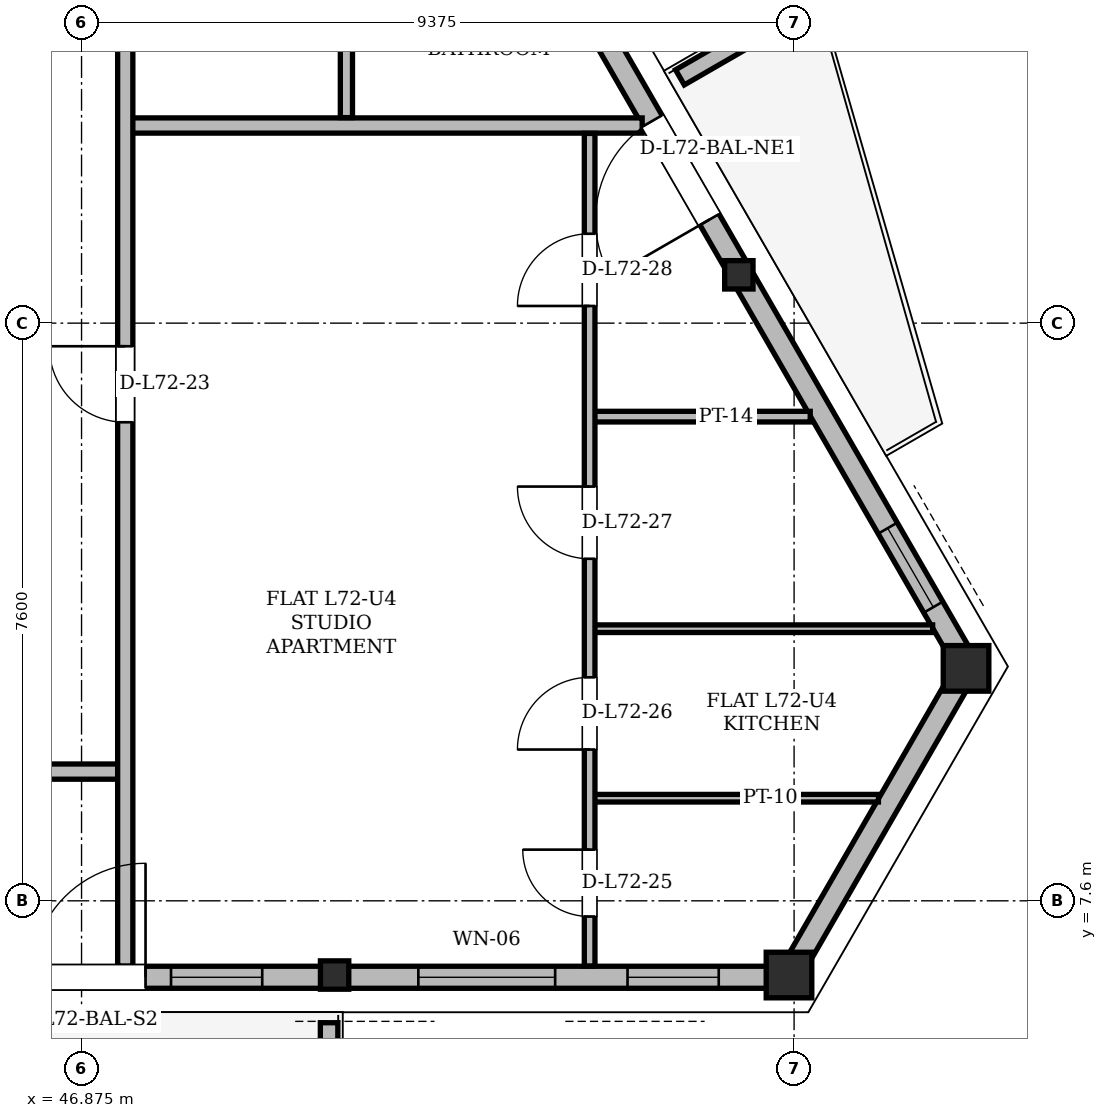
"""IFC4 building model, lengths in metres.
Left out: names, types, materials, properties, quantities, classifications, styles, units other than length and angle.
Written with IfcOpenShell. Run it as: python <this file> out.ifc"""

import sys

from ifc_helpers import new_model, si_unit, direction, frame, frame_2d, origin, origin_2d, place, context, subcontext, project, spatial, polyline, rectangle, hollow_rectangle, i_section, outline, extrude, element, fill, save


model = new_model("IFC4")
c1 = context("Model", 3, precision=1e-05, world=origin(), true_north=direction((0.0, 1.0)))
c2 = subcontext(c1, "Body", "Model", "MODEL_VIEW")
j1 = project(units=[si_unit("LENGTHUNIT", "METRE"), si_unit("PLANEANGLEUNIT", "RADIAN")], contexts=[c1])
p1 = place(None, origin())
s1 = spatial("IfcSite", under=j1, at=p1, CompositionType="ELEMENT")
p2 = place(p1, origin())
s2 = spatial("IfcBuilding", under=s1, at=p2, CompositionType="ELEMENT")
p3 = place(p2, frame((0.0, 0.0, 273.3)))
s3 = spatial("IfcBuildingStorey", under=s2, at=p3, CompositionType="ELEMENT", Elevation=273.3)
for number, where, z_axis, x_axis in (
    (1, (56.171, 6.594, 0.004), (0.006, 0.015, 1.0), (-0.931, 0.365, 0.0)),
    (2, (58.532, 10.683, 0.004), (-0.01, -0.013, 1.0), (0.785, -0.62, 0.0)),
):
    element("IfcColumn", number, at=place(p3, frame(where, z_axis=z_axis, x_axis=x_axis)), inside=s3, PredefinedType="COLUMN", context=c2, shape_type="SweptSolid", body=[
        extrude(hollow_rectangle(XDim=0.6, YDim=0.6, WallThickness=0.045, at=origin_2d()), origin(), (0.0, 0.0, 1.0), 3.892),
    ])
for number, where, z_axis, x_axis in (
    (3, (50.197, 6.594, 0.004), (0.004, 0.015, 1.0), (-0.966, 0.259, 0.0)),
    (4, (55.545, 15.857, 0.004), (-0.011, -0.011, 1.0), (0.707, -0.707, 0.0)),
):
    element("IfcColumn", number, at=place(p3, frame(where, z_axis=z_axis, x_axis=x_axis)), inside=s3, PredefinedType="COLUMN", context=c2, shape_type="SweptSolid", body=[
        extrude(i_section(OverallWidth=0.373, OverallDepth=0.373, WebThickness=0.016, FlangeThickness=0.026, at=origin_2d()), origin(), (0.0, 0.0, 1.0), 3.892),
    ])
p4 = place(p3, frame((18.829, 6.594, 0.0), z_axis=(0.0, 0.0, 1.0), x_axis=(1.0, 0.0, 0.0)))
e5 = element("IfcWall", 5, at=p4, inside=s3, PredefinedType="SOLIDWALL", context=c2, shape_type="SweptSolid", body=[
    extrude(rectangle(XDim=37.343, YDim=0.29, at=frame_2d((18.671, 0.0))), origin(), (0.0, 0.0, 1.0), 3.058),
])
p5 = place(p4, frame((3.639, 0.0, 0.0)))
e6 = element("IfcOpeningElement", 6, at=p5, cuts=e5, PredefinedType="OPENING", context=c2, shape_type="SweptSolid", body=[
    extrude(rectangle(XDim=1.5, YDim=2.2, at=frame_2d((0.75, 1.1))), frame((0.0, 0.145, 0.0), z_axis=(0.0, -1.0, 0.0), x_axis=(1.0, 0.0, 0.0)), (0.0, 0.0, 1.0), 0.29),
])
p6 = place(p4, frame((27.388, 0.0, 0.0)))
e7 = element("IfcOpeningElement", 7, at=p6, cuts=e5, PredefinedType="OPENING", context=c2, shape_type="SweptSolid", body=[
    extrude(rectangle(XDim=1.5, YDim=2.2, at=frame_2d((0.75, 1.1))), frame((0.0, 0.145, 0.0), z_axis=(0.0, -1.0, 0.0), x_axis=(1.0, 0.0, 0.0)), (0.0, 0.0, 1.0), 0.29),
])
p7 = place(p4, frame((11.813, 0.0, 0.85)))
e8 = element("IfcOpeningElement", 8, at=p7, cuts=e5, PredefinedType="OPENING", context=c2, shape_type="SweptSolid", body=[
    extrude(rectangle(XDim=1.2, YDim=1.48, at=frame_2d((0.6, 0.74))), frame((0.0, 0.145, 0.0), z_axis=(0.0, -1.0, 0.0), x_axis=(1.0, 0.0, 0.0)), (0.0, 0.0, 1.0), 0.29),
])
p8 = place(p4, frame((0.897, 0.0, 0.85)))
e9 = element("IfcOpeningElement", 9, at=p8, cuts=e5, PredefinedType="OPENING", context=c2, shape_type="SweptSolid", body=[
    extrude(rectangle(XDim=1.2, YDim=1.48, at=frame_2d((0.6, 0.74))), frame((0.0, 0.145, 0.0), z_axis=(0.0, -1.0, 0.0), x_axis=(1.0, 0.0, 0.0)), (0.0, 0.0, 1.0), 0.29),
])
p9 = place(p4, frame((19.512, 0.0, 0.85)))
e10 = element("IfcOpeningElement", 10, at=p9, cuts=e5, PredefinedType="OPENING", context=c2, shape_type="SweptSolid", body=[
    extrude(rectangle(XDim=1.6, YDim=1.7, at=frame_2d((0.8, 0.85))), frame((0.0, 0.145, 0.0), z_axis=(0.0, -1.0, 0.0), x_axis=(1.0, 0.0, 0.0)), (0.0, 0.0, 1.0), 0.29),
])
p10 = place(p4, frame((29.224, 0.0, 0.85)))
e11 = element("IfcOpeningElement", 11, at=p10, cuts=e5, PredefinedType="OPENING", context=c2, shape_type="SweptSolid", body=[
    extrude(rectangle(XDim=1.2, YDim=1.48, at=frame_2d((0.6, 0.74))), frame((0.0, 0.145, 0.0), z_axis=(0.0, -1.0, 0.0), x_axis=(1.0, 0.0, 0.0)), (0.0, 0.0, 1.0), 0.29),
])
p11 = place(p4, frame((32.478, 0.0, 0.85)))
e12 = element("IfcOpeningElement", 12, at=p11, cuts=e5, PredefinedType="OPENING", context=c2, shape_type="SweptSolid", body=[
    extrude(rectangle(XDim=1.8, YDim=1.75, at=frame_2d((0.9, 0.875))), frame((0.0, 0.145, 0.0), z_axis=(0.0, -1.0, 0.0), x_axis=(1.0, 0.0, 0.0)), (0.0, 0.0, 1.0), 0.29),
])
p12 = place(p4, frame((35.23, 0.0, 0.85)))
e13 = element("IfcOpeningElement", 13, at=p12, cuts=e5, PredefinedType="OPENING", context=c2, shape_type="SweptSolid", body=[
    extrude(rectangle(XDim=1.2, YDim=1.48, at=frame_2d((0.6, 0.74))), frame((0.0, 0.145, 0.0), z_axis=(0.0, -1.0, 0.0), x_axis=(1.0, 0.0, 0.0)), (0.0, 0.0, 1.0), 0.29),
])
p13 = place(p3, frame((56.171, 6.594, 0.0), z_axis=(0.0, 0.0, 1.0), x_axis=(0.499959680857, 0.866048680801, 0.0)))
e14 = element("IfcWall", 14, at=p13, inside=s3, PredefinedType="SOLIDWALL", context=c2, shape_type="SweptSolid", body=[
    extrude(rectangle(XDim=4.722, YDim=0.29, at=frame_2d((2.361, 0.0))), origin(), (0.0, 0.0, 1.0), 3.058),
])
p14 = place(p3, frame((58.532, 10.683, 0.0), z_axis=(0.0, 0.0, 1.0), x_axis=(-0.499999381892, 0.866025760649, 0.0)))
e15 = element("IfcWall", 15, at=p14, inside=s3, PredefinedType="SOLIDWALL", context=c2, shape_type="SweptSolid", body=[
    extrude(rectangle(XDim=37.343, YDim=0.29, at=frame_2d((18.671, 0.0))), origin(), (0.0, 0.0, 1.0), 3.058),
])
p15 = place(p14, frame((6.789, 0.0, 0.0)))
e16 = element("IfcOpeningElement", 16, at=p15, cuts=e15, PredefinedType="OPENING", context=c2, shape_type="SweptSolid", body=[
    extrude(rectangle(XDim=1.5, YDim=2.2, at=frame_2d((0.75, 1.1))), frame((0.0, 0.145, 0.0), z_axis=(0.0, -1.0, 0.0), x_axis=(1.0, 0.0, 0.0)), (0.0, 0.0, 1.0), 0.29),
])
p16 = place(p14, frame((27.808, 0.0, 0.0)))
e17 = element("IfcOpeningElement", 17, at=p16, cuts=e15, PredefinedType="OPENING", context=c2, shape_type="SweptSolid", body=[
    extrude(rectangle(XDim=1.5, YDim=2.2, at=frame_2d((0.75, 1.1))), frame((0.0, 0.145, 0.0), z_axis=(0.0, -1.0, 0.0), x_axis=(1.0, 0.0, 0.0)), (0.0, 0.0, 1.0), 0.29),
])
p17 = place(p14, frame((0.901, 0.0, 0.85)))
e18 = element("IfcOpeningElement", 18, at=p17, cuts=e15, PredefinedType="OPENING", context=c2, shape_type="SweptSolid", body=[
    extrude(rectangle(XDim=1.2, YDim=1.48, at=frame_2d((0.6, 0.74))), frame((0.0, 0.145, 0.0), z_axis=(0.0, -1.0, 0.0), x_axis=(1.0, 0.0, 0.0)), (0.0, 0.0, 1.0), 0.29),
])
p18 = place(p14, frame((12.688, 0.0, 0.85)))
e19 = element("IfcOpeningElement", 19, at=p18, cuts=e15, PredefinedType="OPENING", context=c2, shape_type="SweptSolid", body=[
    extrude(rectangle(XDim=3.0, YDim=2.098, at=frame_2d((1.5, 1.049))), frame((0.0, 0.145, 0.0), z_axis=(0.0, -1.0, 0.0), x_axis=(1.0, 0.0, 0.0)), (0.0, 0.0, 1.0), 0.29),
])
p19 = place(p14, frame((17.814, 0.0, 0.85)))
e20 = element("IfcOpeningElement", 20, at=p19, cuts=e15, PredefinedType="OPENING", context=c2, shape_type="SweptSolid", body=[
    extrude(rectangle(XDim=2.6, YDim=1.95, at=frame_2d((1.3, 0.975))), frame((0.0, 0.145, 0.0), z_axis=(0.0, -1.0, 0.0), x_axis=(1.0, 0.0, 0.0)), (0.0, 0.0, 1.0), 0.29),
])
p20 = place(p14, frame((35.362, 0.0, 0.85)))
e21 = element("IfcOpeningElement", 21, at=p20, cuts=e15, PredefinedType="OPENING", context=c2, shape_type="SweptSolid", body=[
    extrude(rectangle(XDim=1.2, YDim=1.48, at=frame_2d((0.6, 0.74))), frame((0.0, 0.145, 0.0), z_axis=(0.0, -1.0, 0.0), x_axis=(1.0, 0.0, 0.0)), (0.0, 0.0, 1.0), 0.29),
])
p21 = place(p14, frame((33.788, 0.0, 0.85)))
e22 = element("IfcOpeningElement", 22, at=p21, cuts=e15, PredefinedType="OPENING", context=c2, shape_type="SweptSolid", body=[
    extrude(rectangle(XDim=1.2, YDim=1.48, at=frame_2d((0.6, 0.74))), frame((0.0, 0.145, 0.0), z_axis=(0.0, -1.0, 0.0), x_axis=(1.0, 0.0, 0.0)), (0.0, 0.0, 1.0), 0.29),
])
p22 = place(p14, frame((22.74, 0.0, 0.85)))
e23 = element("IfcOpeningElement", 23, at=p22, cuts=e15, PredefinedType="OPENING", context=c2, shape_type="SweptSolid", body=[
    extrude(rectangle(XDim=1.2, YDim=1.48, at=frame_2d((0.6, 0.74))), frame((0.0, 0.145, 0.0), z_axis=(0.0, -1.0, 0.0), x_axis=(1.0, 0.0, 0.0)), (0.0, 0.0, 1.0), 0.29),
])
p23 = place(p14, frame((31.705, 0.0, 0.85)))
e24 = element("IfcOpeningElement", 24, at=p23, cuts=e15, PredefinedType="OPENING", context=c2, shape_type="SweptSolid", body=[
    extrude(rectangle(XDim=1.2, YDim=1.48, at=frame_2d((0.6, 0.74))), frame((0.0, 0.145, 0.0), z_axis=(0.0, -1.0, 0.0), x_axis=(1.0, 0.0, 0.0)), (0.0, 0.0, 1.0), 0.29),
])
for number, where, z_axis, x_axis in (
    (25, (50.132, 5.996, 0.0), (0.0, 0.0, 1.0), (0.0, -1.0, 0.0)),
    (26, (54.748, 18.434, 0.0), (0.0, 0.0, 1.0), (0.866, 0.5, 0.0)),
):
    element("IfcWall", number, at=place(p3, frame(where, z_axis=z_axis, x_axis=x_axis)), inside=s3, PredefinedType="PARAPET", context=c2, shape_type="SweptSolid", body=[
        extrude(outline(polyline([(0.0, 0.0), (2.042, 0.0), (2.042, 1.1), (0.0, 1.32), (0.0, 0.0)])), frame((0.0, 0.115, 0.0), z_axis=(0.0, -1.0, 0.0), x_axis=(1.0, 0.0, 0.0)), (0.0, 0.0, 1.0), 0.23),
    ])
p24 = place(p3, frame((53.559, 8.95, 0.0), z_axis=(0.0, 0.0, 1.0), x_axis=(1.0, 0.0, 0.0)))
e27 = element("IfcWall", 27, at=p24, inside=s3, PredefinedType="PARTITIONING", context=c2, shape_type="SweptSolid", body=[
    extrude(rectangle(XDim=3.801, YDim=0.1, at=frame_2d((1.9, 0.0))), origin(), (0.0, 0.0, 1.0), 3.68),
])
p25 = place(p3, frame((25.6, 9.3, 0.0), z_axis=(0.0, 0.0, 1.0), x_axis=(1.0, 0.0, 0.0)))
e28 = element("IfcWall", 28, at=p25, inside=s3, PredefinedType="PARTITIONING", context=c2, shape_type="SweptSolid", body=[
    extrude(rectangle(XDim=21.85, YDim=0.2, at=frame_2d((10.925, 0.0))), origin(), (0.0, 0.0, 1.0), 3.68),
])
p26 = place(p25, frame((3.841, 0.0, 0.0)))
e29 = element("IfcOpeningElement", 29, at=p26, cuts=e28, PredefinedType="OPENING", context=c2, shape_type="SweptSolid", body=[
    extrude(rectangle(XDim=1.0, YDim=2.18, at=frame_2d((0.5, 1.09))), frame((0.0, 0.1, 0.0), z_axis=(0.0, -1.0, 0.0), x_axis=(1.0, 0.0, 0.0)), (0.0, 0.0, 1.0), 0.2),
])
p27 = place(p25, frame((16.232, 0.0, 0.0)))
e30 = element("IfcOpeningElement", 30, at=p27, cuts=e28, PredefinedType="OPENING", context=c2, shape_type="SweptSolid", body=[
    extrude(rectangle(XDim=1.0, YDim=2.18, at=frame_2d((0.5, 1.09))), frame((0.0, 0.1, 0.0), z_axis=(0.0, -1.0, 0.0), x_axis=(1.0, 0.0, 0.0)), (0.0, 0.0, 1.0), 0.2),
])
p28 = place(p3, frame((53.559, 11.18, 0.0), z_axis=(0.0, 0.0, 1.0), x_axis=(1.0, 0.0, 0.0)))
e31 = element("IfcWall", 31, at=p28, inside=s3, PredefinedType="PARTITIONING", context=c2, shape_type="SweptSolid", body=[
    extrude(rectangle(XDim=4.514, YDim=0.1, at=frame_2d((2.257, 0.0))), origin(), (0.0, 0.0, 1.0), 3.68),
])
p29 = place(p3, frame((53.559, 13.97, 0.0), z_axis=(0.0, 0.0, 1.0), x_axis=(1.0, 0.0, 0.0)))
e32 = element("IfcWall", 32, at=p29, inside=s3, PredefinedType="PARTITIONING", context=c2, shape_type="SweptSolid", body=[
    extrude(rectangle(XDim=2.903, YDim=0.14, at=frame_2d((1.452, 0.0))), origin(), (0.0, 0.0, 1.0), 3.68),
])
p30 = place(p3, frame((47.45, 17.8, 0.0), z_axis=(0.0, 0.0, 1.0), x_axis=(1.0, 0.0, 0.0)))
e33 = element("IfcWall", 33, at=p30, inside=s3, PredefinedType="PARTITIONING", context=c2, shape_type="SweptSolid", body=[
    extrude(rectangle(XDim=6.801, YDim=0.2, at=frame_2d((3.401, 0.0))), origin(), (0.0, 0.0, 1.0), 3.68),
])
p31 = place(p3, frame((47.45, 6.743, 0.0), z_axis=(0.0, 0.0, 1.0), x_axis=(0.0, 1.0, 0.0)))
e34 = element("IfcWall", 34, at=p31, inside=s3, PredefinedType="PARTITIONING", context=c2, shape_type="SweptSolid", body=[
    extrude(rectangle(XDim=22.837, YDim=0.2, at=frame_2d((11.418, 0.0))), origin(), (0.0, 0.0, 1.0), 3.058),
])
p32 = place(p31, frame((7.153, 0.0, 0.0)))
e35 = element("IfcOpeningElement", 35, at=p32, cuts=e34, PredefinedType="OPENING", context=c2, shape_type="SweptSolid", body=[
    extrude(rectangle(XDim=1.0, YDim=2.18, at=frame_2d((0.5, 1.09))), frame((0.0, 0.1, 0.0), z_axis=(0.0, -1.0, 0.0), x_axis=(1.0, 0.0, 0.0)), (0.0, 0.0, 1.0), 0.2),
])
p33 = place(p31, frame((15.139, 0.0, 0.0)))
e36 = element("IfcOpeningElement", 36, at=p33, cuts=e34, PredefinedType="OPENING", context=c2, shape_type="SweptSolid", body=[
    extrude(rectangle(XDim=1.0, YDim=2.18, at=frame_2d((0.5, 1.09))), frame((0.0, 0.1, 0.0), z_axis=(0.0, -1.0, 0.0), x_axis=(1.0, 0.0, 0.0)), (0.0, 0.0, 1.0), 0.2),
])
p34 = place(p3, frame((50.36, 17.904, 0.0), z_axis=(0.0, 0.0, 1.0), x_axis=(0.0, 1.0, 0.0)))
e37 = element("IfcWall", 37, at=p34, inside=s3, PredefinedType="PARTITIONING", context=c2, shape_type="SweptSolid", body=[
    extrude(rectangle(XDim=2.672, YDim=0.16, at=frame_2d((1.336, 0.0))), origin(), (0.0, 0.0, 1.0), 3.68),
])
p35 = place(p3, frame((53.56, 6.743, 0.0), z_axis=(0.0, 0.0, 1.0), x_axis=(0.0, 1.0, 0.0)))
e38 = element("IfcWall", 38, at=p35, inside=s3, PredefinedType="PARTITIONING", context=c2, shape_type="SweptSolid", body=[
    extrude(rectangle(XDim=10.953, YDim=0.14, at=frame_2d((5.477, 0.0))), origin(), (0.0, 0.0, 1.0), 3.266),
])
p36 = place(p35, frame((0.65, 0.0, 0.0)))
e39 = element("IfcOpeningElement", 39, at=p36, cuts=e38, PredefinedType="OPENING", context=c2, shape_type="SweptSolid", body=[
    extrude(rectangle(XDim=0.88, YDim=2.08, at=frame_2d((0.44, 1.04))), frame((0.0, 0.07, 0.0), z_axis=(0.0, -1.0, 0.0), x_axis=(1.0, 0.0, 0.0)), (0.0, 0.0, 1.0), 0.14),
])
p37 = place(p35, frame((2.847, 0.0, 0.0)))
e40 = element("IfcOpeningElement", 40, at=p37, cuts=e38, PredefinedType="OPENING", context=c2, shape_type="SweptSolid", body=[
    extrude(rectangle(XDim=0.95, YDim=2.1, at=frame_2d((0.475, 1.05))), frame((0.0, 0.07, 0.0), z_axis=(0.0, -1.0, 0.0), x_axis=(1.0, 0.0, 0.0)), (0.0, 0.0, 1.0), 0.14),
])
p38 = place(p35, frame((5.357, 0.0, 0.0)))
e41 = element("IfcOpeningElement", 41, at=p38, cuts=e38, PredefinedType="OPENING", context=c2, shape_type="SweptSolid", body=[
    extrude(rectangle(XDim=0.95, YDim=2.1, at=frame_2d((0.475, 1.05))), frame((0.0, 0.07, 0.0), z_axis=(0.0, -1.0, 0.0), x_axis=(1.0, 0.0, 0.0)), (0.0, 0.0, 1.0), 0.14),
])
p39 = place(p35, frame((8.683, 0.0, 0.0)))
e42 = element("IfcOpeningElement", 42, at=p39, cuts=e38, PredefinedType="OPENING", context=c2, shape_type="SweptSolid", body=[
    extrude(rectangle(XDim=0.95, YDim=2.1, at=frame_2d((0.475, 1.05))), frame((0.0, 0.07, 0.0), z_axis=(0.0, -1.0, 0.0), x_axis=(1.0, 0.0, 0.0)), (0.0, 0.0, 1.0), 0.14),
])
p40 = place(p6, origin())
e43 = element("IfcDoor", 43, at=p40, inside=s3, OperationType="SINGLE_SWING_RIGHT", PredefinedType="DOOR", context=c2, shape_type="SweptSolid", body=[
    extrude(rectangle(XDim=1.5, YDim=2.2, at=frame_2d((0.75, 1.1))), frame((0.0, 0.025, 0.0), z_axis=(0.0, -1.0, 0.0), x_axis=(1.0, 0.0, 0.0)), (0.0, 0.0, 1.0), 0.05),
])
fill(e7, e43)
p41 = place(p10, origin())
e44 = element("IfcWindow", 44, at=p41, inside=s3, PartitioningType="SINGLE_PANEL", PredefinedType="WINDOW", context=c2, shape_type="SweptSolid", body=[
    extrude(rectangle(XDim=1.2, YDim=1.48, at=frame_2d((0.6, 0.74))), frame((0.0, 0.03, 0.0), z_axis=(0.0, -1.0, 0.0), x_axis=(1.0, 0.0, 0.0)), (0.0, 0.0, 1.0), 0.06),
])
fill(e11, e44)
p42 = place(p11, origin())
e45 = element("IfcWindow", 45, at=p42, inside=s3, PartitioningType="SINGLE_PANEL", PredefinedType="WINDOW", context=c2, shape_type="SweptSolid", body=[
    extrude(rectangle(XDim=1.8, YDim=1.75, at=frame_2d((0.9, 0.875))), frame((0.0, 0.03, 0.0), z_axis=(0.0, -1.0, 0.0), x_axis=(1.0, 0.0, 0.0)), (0.0, 0.0, 1.0), 0.06),
])
fill(e12, e45)
p43 = place(p12, origin())
e46 = element("IfcWindow", 46, at=p43, inside=s3, PartitioningType="SINGLE_PANEL", PredefinedType="WINDOW", context=c2, shape_type="SweptSolid", body=[
    extrude(rectangle(XDim=1.2, YDim=1.48, at=frame_2d((0.6, 0.74))), frame((0.0, 0.03, 0.0), z_axis=(0.0, -1.0, 0.0), x_axis=(1.0, 0.0, 0.0)), (0.0, 0.0, 1.0), 0.06),
])
fill(e13, e46)
p44 = place(p15, origin())
e47 = element("IfcDoor", 47, at=p44, inside=s3, OperationType="SINGLE_SWING_LEFT", PredefinedType="DOOR", context=c2, shape_type="SweptSolid", body=[
    extrude(rectangle(XDim=1.5, YDim=2.2, at=frame_2d((0.75, 1.1))), frame((0.0, 0.025, 0.0), z_axis=(0.0, -1.0, 0.0), x_axis=(1.0, 0.0, 0.0)), (0.0, 0.0, 1.0), 0.05),
])
fill(e16, e47)
p45 = place(p17, origin())
e48 = element("IfcWindow", 48, at=p45, inside=s3, PartitioningType="SINGLE_PANEL", PredefinedType="WINDOW", context=c2, shape_type="SweptSolid", body=[
    extrude(rectangle(XDim=1.2, YDim=1.48, at=frame_2d((0.6, 0.74))), frame((0.0, 0.03, 0.0), z_axis=(0.0, -1.0, 0.0), x_axis=(1.0, 0.0, 0.0)), (0.0, 0.0, 1.0), 0.06),
])
fill(e18, e48)
p46 = place(p32, origin())
e49 = element("IfcDoor", 49, at=p46, inside=s3, OperationType="SINGLE_SWING_RIGHT", PredefinedType="DOOR", context=c2, shape_type="SweptSolid", body=[
    extrude(rectangle(XDim=1.0, YDim=2.18, at=frame_2d((0.5, 1.09))), frame((0.0, 0.025, 0.0), z_axis=(0.0, -1.0, 0.0), x_axis=(1.0, 0.0, 0.0)), (0.0, 0.0, 1.0), 0.05),
])
fill(e35, e49)
p47 = place(p36, origin())
e50 = element("IfcDoor", 50, at=p47, inside=s3, OperationType="SINGLE_SWING_RIGHT", PredefinedType="DOOR", context=c2, shape_type="SweptSolid", body=[
    extrude(rectangle(XDim=0.88, YDim=2.08, at=frame_2d((0.44, 1.04))), frame((0.0, 0.025, 0.0), z_axis=(0.0, -1.0, 0.0), x_axis=(1.0, 0.0, 0.0)), (0.0, 0.0, 1.0), 0.05),
])
fill(e39, e50)
p48 = place(p37, origin())
e51 = element("IfcDoor", 51, at=p48, inside=s3, OperationType="SINGLE_SWING_LEFT", PredefinedType="DOOR", context=c2, shape_type="SweptSolid", body=[
    extrude(rectangle(XDim=0.95, YDim=2.1, at=frame_2d((0.475, 1.05))), frame((0.0, 0.025, 0.0), z_axis=(0.0, -1.0, 0.0), x_axis=(1.0, 0.0, 0.0)), (0.0, 0.0, 1.0), 0.05),
])
fill(e40, e51)
p49 = place(p38, origin())
e52 = element("IfcDoor", 52, at=p49, inside=s3, OperationType="SINGLE_SWING_RIGHT", PredefinedType="DOOR", context=c2, shape_type="SweptSolid", body=[
    extrude(rectangle(XDim=0.95, YDim=2.1, at=frame_2d((0.475, 1.05))), frame((0.0, 0.025, 0.0), z_axis=(0.0, -1.0, 0.0), x_axis=(1.0, 0.0, 0.0)), (0.0, 0.0, 1.0), 0.05),
])
fill(e41, e52)
p50 = place(p39, origin())
e53 = element("IfcDoor", 53, at=p50, inside=s3, OperationType="SINGLE_SWING_LEFT", PredefinedType="DOOR", context=c2, shape_type="SweptSolid", body=[
    extrude(rectangle(XDim=0.95, YDim=2.1, at=frame_2d((0.475, 1.05))), frame((0.0, 0.025, 0.0), z_axis=(0.0, -1.0, 0.0), x_axis=(1.0, 0.0, 0.0)), (0.0, 0.0, 1.0), 0.05),
])
fill(e42, e53)
save(model, sys.argv[1])
